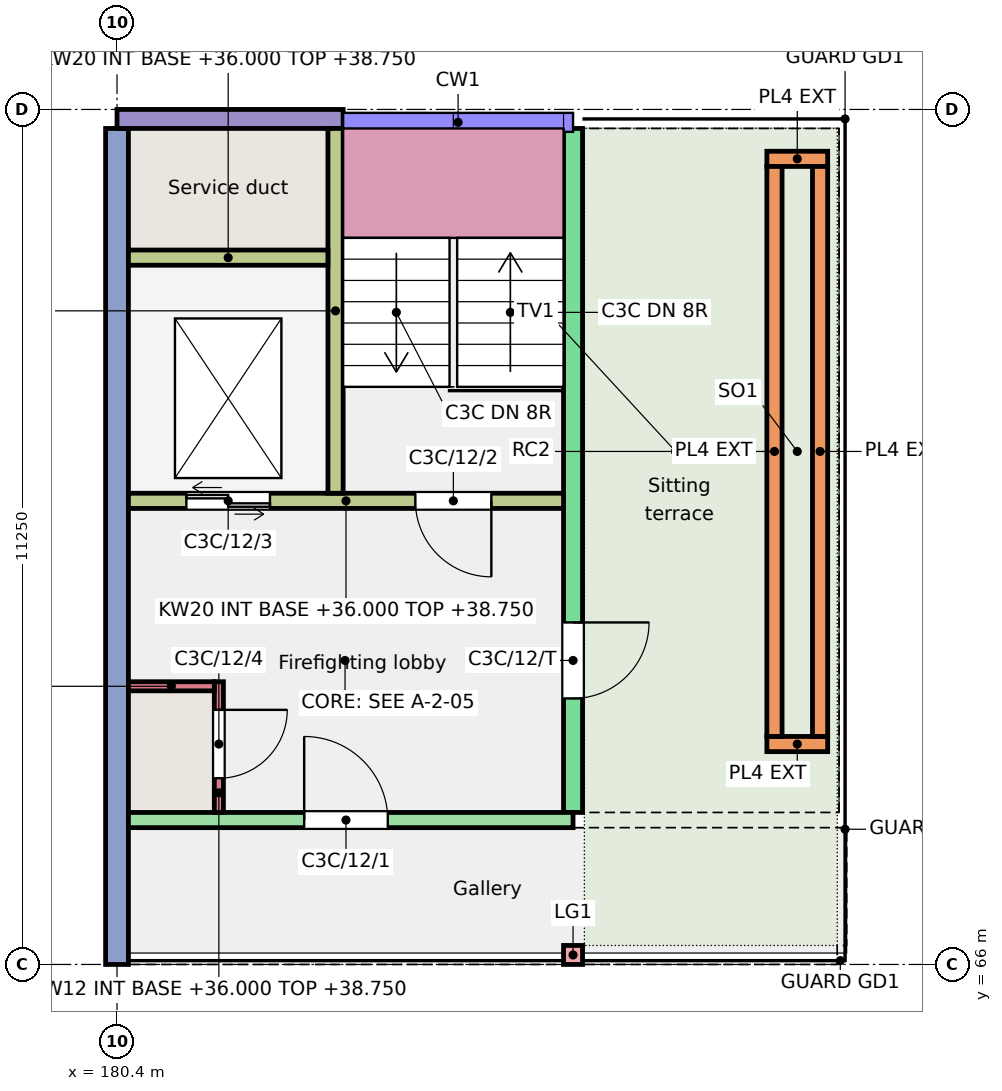
"""IFC4 building model, lengths in metres.
Left out: names, types, materials, properties, quantities, classifications, styles, units other than length and angle.
Written with IfcOpenShell. Run it as: python <this file> out.ifc"""

import sys

from ifc_helpers import new_model, si_unit, direction, frame, frame_2d, origin, origin_2d, place, context, subcontext, project, spatial, rectangle, extrude, element, fill, save


model = new_model("IFC4")
c1 = context("Model", 3, precision=1e-05, world=origin(), true_north=direction((0.0, 1.0)))
c2 = subcontext(c1, "Body", "Model", "MODEL_VIEW")
j1 = project(units=[si_unit("LENGTHUNIT", "METRE"), si_unit("PLANEANGLEUNIT", "RADIAN")], contexts=[c1])
p1 = place(None, origin())
s1 = spatial("IfcSite", under=j1, at=p1, CompositionType="ELEMENT")
p2 = place(p1, origin())
s2 = spatial("IfcBuilding", under=s1, at=p2, CompositionType="ELEMENT")
p3 = place(p2, frame((0.0, 0.0, 36.0)))
s3 = spatial("IfcBuildingStorey", under=s2, at=p3, CompositionType="ELEMENT", Elevation=36.0)
p4 = place(p3, frame((180.4, 66.0, 0.0), z_axis=(0.0, 0.0, 1.0), x_axis=(0.0, 1.0, 0.0)))
e1 = element("IfcWall", 1, at=p4, inside=s3, PredefinedType="SHEAR", context=c2, shape_type="SweptSolid", body=[
    extrude(rectangle(XDim=11.0, YDim=0.3, at=frame_2d((5.5, 0.0))), origin(), (0.0, 0.0, 1.0), 3.0),
])
p5 = place(p3, frame((186.4, 68.0, 0.0), z_axis=(0.0, 0.0, 1.0), x_axis=(0.0, 1.0, 0.0)))
e2 = element("IfcWall", 2, at=p5, inside=s3, PredefinedType="SHEAR", context=c2, shape_type="SweptSolid", body=[
    extrude(rectangle(XDim=9.0, YDim=0.25, at=frame_2d((4.5, 0.0))), origin(), (0.0, 0.0, 1.0), 3.0),
])
p6 = place(p5, frame((1.5, 0.0, 0.0)))
e3 = element("IfcOpeningElement", 3, at=p6, cuts=e2, PredefinedType="OPENING", context=c2, shape_type="SweptSolid", body=[
    extrude(rectangle(XDim=1.0, YDim=2.1, at=frame_2d((0.5, 1.05))), frame((0.0, 0.135, 0.0), z_axis=(0.0, -1.0, 0.0), x_axis=(1.0, 0.0, 0.0)), (0.0, 0.0, 1.0), 0.27),
])
p7 = place(p3, frame((180.4, 77.125, 0.0), z_axis=(0.0, 0.0, 1.0), x_axis=(1.0, 0.0, 0.0)))
e4 = element("IfcWall", 4, at=p7, inside=s3, PredefinedType="SOLIDWALL", context=c2, shape_type="SweptSolid", body=[
    extrude(rectangle(XDim=2.975, YDim=0.25, at=frame_2d((1.488, 0.0))), origin(), (0.0, 0.0, 1.0), 3.0),
])
p8 = place(p3, frame((180.55, 67.9, 0.0), z_axis=(0.0, 0.0, 1.0), x_axis=(1.0, 0.0, 0.0)))
e5 = element("IfcWall", 5, at=p8, inside=s3, PredefinedType="SHEAR", context=c2, shape_type="SweptSolid", body=[
    extrude(rectangle(XDim=5.85, YDim=0.2, at=frame_2d((2.925, 0.0))), origin(), (0.0, 0.0, 1.0), 2.75),
])
p9 = place(p8, frame((2.312, 0.0, 0.0)))
e6 = element("IfcOpeningElement", 6, at=p9, cuts=e5, PredefinedType="OPENING", context=c2, shape_type="SweptSolid", body=[
    extrude(rectangle(XDim=1.1, YDim=2.1, at=frame_2d((0.55, 1.05))), frame((0.0, 0.11, 0.0), z_axis=(0.0, -1.0, 0.0), x_axis=(1.0, 0.0, 0.0)), (0.0, 0.0, 1.0), 0.22),
])
p10 = place(p3, frame((180.55, 72.1, 0.0), z_axis=(0.0, 0.0, 1.0), x_axis=(1.0, 0.0, 0.0)))
e7 = element("IfcWall", 7, at=p10, inside=s3, PredefinedType="SHEAR", context=c2, shape_type="SweptSolid", body=[
    extrude(rectangle(XDim=5.725, YDim=0.2, at=frame_2d((2.862, 0.0))), origin(), (0.0, 0.0, 1.0), 2.75),
])
p11 = place(p10, frame((3.775, 0.0, 0.0)))
e8 = element("IfcOpeningElement", 8, at=p11, cuts=e7, PredefinedType="OPENING", context=c2, shape_type="SweptSolid", body=[
    extrude(rectangle(XDim=1.0, YDim=2.1, at=frame_2d((0.5, 1.05))), frame((0.0, 0.11, 0.0), z_axis=(0.0, -1.0, 0.0), x_axis=(1.0, 0.0, 0.0)), (0.0, 0.0, 1.0), 0.22),
])
p12 = place(p10, frame((0.762, 0.0, 0.0)))
e9 = element("IfcOpeningElement", 9, at=p12, cuts=e7, PredefinedType="OPENING", context=c2, shape_type="SweptSolid", body=[
    extrude(rectangle(XDim=1.1, YDim=2.1, at=frame_2d((0.55, 1.05))), frame((0.0, 0.11, 0.0), z_axis=(0.0, -1.0, 0.0), x_axis=(1.0, 0.0, 0.0)), (0.0, 0.0, 1.0), 0.22),
])
p13 = place(p3, frame((183.275, 72.2, 0.0), z_axis=(0.0, 0.0, 1.0), x_axis=(0.0, 1.0, 0.0)))
e10 = element("IfcWall", 10, at=p13, inside=s3, PredefinedType="SHEAR", context=c2, shape_type="SweptSolid", body=[
    extrude(rectangle(XDim=4.8, YDim=0.2, at=frame_2d((2.4, 0.0))), origin(), (0.0, 0.0, 1.0), 2.75),
])
p14 = place(p3, frame((180.55, 75.3, 0.0), z_axis=(0.0, 0.0, 1.0), x_axis=(1.0, 0.0, 0.0)))
e11 = element("IfcWall", 11, at=p14, inside=s3, PredefinedType="SHEAR", context=c2, shape_type="SweptSolid", body=[
    extrude(rectangle(XDim=2.625, YDim=0.2, at=frame_2d((1.312, 0.0))), origin(), (0.0, 0.0, 1.0), 2.75),
])
p15 = place(p3, frame((181.74, 68.0, 0.0), z_axis=(0.0, 0.0, 1.0), x_axis=(0.0, 1.0, 0.0)))
e12 = element("IfcWall", 12, at=p15, inside=s3, PredefinedType="SHEAR", context=c2, shape_type="SweptSolid", body=[
    extrude(rectangle(XDim=1.72, YDim=0.12, at=frame_2d((0.86, 0.0))), origin(), (0.0, 0.0, 1.0), 2.75),
])
p16 = place(p15, frame((0.45, 0.0, 0.0)))
e13 = element("IfcOpeningElement", 13, at=p16, cuts=e12, PredefinedType="OPENING", context=c2, shape_type="SweptSolid", body=[
    extrude(rectangle(XDim=0.9, YDim=2.1, at=frame_2d((0.45, 1.05))), frame((0.0, 0.07, 0.0), z_axis=(0.0, -1.0, 0.0), x_axis=(1.0, 0.0, 0.0)), (0.0, 0.0, 1.0), 0.14),
])
p17 = place(p3, frame((180.55, 69.66, 0.0), z_axis=(0.0, 0.0, 1.0), x_axis=(1.0, 0.0, 0.0)))
e14 = element("IfcWall", 14, at=p17, inside=s3, PredefinedType="SHEAR", context=c2, shape_type="SweptSolid", body=[
    extrude(rectangle(XDim=1.13, YDim=0.12, at=frame_2d((0.565, 0.0))), origin(), (0.0, 0.0, 1.0), 2.75),
])
p18 = place(p3, frame((186.4, 66.125, 0.0), z_axis=(0.0, 0.0, 1.0), x_axis=(1.0, 0.0, 0.0)))
e15 = element("IfcColumn", 15, at=p18, inside=s3, PredefinedType="COLUMN", context=c2, shape_type="SweptSolid", body=[
    extrude(rectangle(XDim=0.25, YDim=0.25, at=origin_2d()), origin(), (0.0, 0.0, 1.0), 3.0),
])
for number, where, z_axis, x_axis in (
    (16, (188.95, 68.9, 0.01), (0.0, 0.0, 1.0), (1.0, 0.0, 0.0)),
    (17, (188.95, 76.6, 0.01), (0.0, 0.0, 1.0), (1.0, 0.0, 0.0)),
):
    element("IfcWall", number, at=place(p3, frame(where, z_axis=z_axis, x_axis=x_axis)), inside=s3, PredefinedType="SOLIDWALL", context=c2, shape_type="SweptSolid", body=[
        extrude(rectangle(XDim=0.8, YDim=0.2, at=frame_2d((0.4, 0.0))), origin(), (0.0, 0.0, 1.0), 0.45),
    ])
for number, where, z_axis, x_axis in (
    (18, (189.05, 69.0, 0.01), (0.0, 0.0, 1.0), (0.0, 1.0, 0.0)),
    (19, (189.65, 69.0, 0.01), (0.0, 0.0, 1.0), (0.0, 1.0, 0.0)),
):
    element("IfcWall", number, at=place(p3, frame(where, z_axis=z_axis, x_axis=x_axis)), inside=s3, PredefinedType="SOLIDWALL", context=c2, shape_type="SweptSolid", body=[
        extrude(rectangle(XDim=7.5, YDim=0.2, at=frame_2d((3.75, 0.0))), origin(), (0.0, 0.0, 1.0), 0.45),
    ])
p19 = place(p9, origin())
e20 = element("IfcDoor", 20, at=p19, inside=s3, OperationType="SINGLE_SWING_LEFT", PredefinedType="DOOR", context=c2, shape_type="SweptSolid", body=[
    extrude(rectangle(XDim=1.1, YDim=2.1, at=frame_2d((0.55, 1.05))), frame((0.0, 0.025, 0.0), z_axis=(0.0, -1.0, 0.0), x_axis=(1.0, 0.0, 0.0)), (0.0, 0.0, 1.0), 0.05),
])
fill(e6, e20)
p20 = place(p11, origin())
e21 = element("IfcDoor", 21, at=p20, inside=s3, OperationType="SINGLE_SWING_RIGHT", PredefinedType="DOOR", context=c2, shape_type="SweptSolid", body=[
    extrude(rectangle(XDim=1.0, YDim=2.1, at=frame_2d((0.5, 1.05))), frame((0.0, 0.025, 0.0), z_axis=(0.0, -1.0, 0.0), x_axis=(1.0, 0.0, 0.0)), (0.0, 0.0, 1.0), 0.05),
])
fill(e8, e21)
p21 = place(p12, origin())
e22 = element("IfcDoor", 22, at=p21, inside=s3, OperationType="DOUBLE_DOOR_SLIDING", PredefinedType="DOOR", context=c2, shape_type="SweptSolid", body=[
    extrude(rectangle(XDim=1.1, YDim=2.1, at=frame_2d((0.55, 1.05))), frame((0.0, 0.025, 0.0), z_axis=(0.0, -1.0, 0.0), x_axis=(1.0, 0.0, 0.0)), (0.0, 0.0, 1.0), 0.05),
])
fill(e9, e22)
p22 = place(p16, origin())
e23 = element("IfcDoor", 23, at=p22, inside=s3, OperationType="SINGLE_SWING_RIGHT", PredefinedType="DOOR", context=c2, shape_type="SweptSolid", body=[
    extrude(rectangle(XDim=0.9, YDim=2.1, at=frame_2d((0.45, 1.05))), frame((0.0, 0.025, 0.0), z_axis=(0.0, -1.0, 0.0), x_axis=(1.0, 0.0, 0.0)), (0.0, 0.0, 1.0), 0.05),
])
fill(e13, e23)
p23 = place(p6, origin())
e24 = element("IfcDoor", 24, at=p23, inside=s3, OperationType="SINGLE_SWING_RIGHT", PredefinedType="DOOR", context=c2, shape_type="SweptSolid", body=[
    extrude(rectangle(XDim=1.0, YDim=2.1, at=frame_2d((0.5, 1.05))), frame((0.0, 0.025, 0.0), z_axis=(0.0, -1.0, 0.0), x_axis=(1.0, 0.0, 0.0)), (0.0, 0.0, 1.0), 0.05),
])
fill(e3, e24)
save(model, sys.argv[1])
